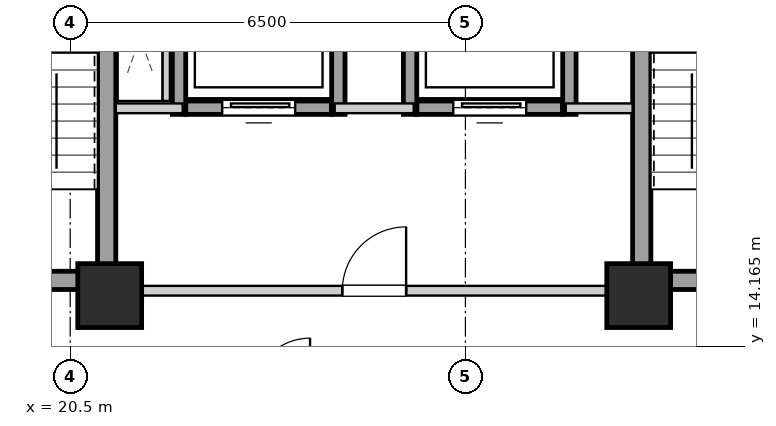
"""IFC4 building model, lengths in metres.
Left out: names, types, materials, properties, quantities, classifications, styles, units other than length and angle.
Written with IfcOpenShell. Run it as: python <this file> out.ifc"""

import sys

from ifc_helpers import new_model, si_unit, direction, frame, frame_2d, origin, origin_2d, place, context, subcontext, project, spatial, rectangle, extrude, element, fill, save


model = new_model("IFC4")
c1 = context("Model", 3, precision=1e-05, world=origin(), true_north=direction((0.0, 1.0)))
c2 = subcontext(c1, "Body", "Model", "MODEL_VIEW")
j1 = project(units=[si_unit("LENGTHUNIT", "METRE"), si_unit("PLANEANGLEUNIT", "RADIAN")], contexts=[c1])
p1 = place(None, origin())
s1 = spatial("IfcSite", under=j1, at=p1, CompositionType="ELEMENT")
p2 = place(p1, origin())
s2 = spatial("IfcBuilding", under=s1, at=p2, CompositionType="ELEMENT")
p3 = place(p2, frame((0.0, 0.0, 84.7)))
s3 = spatial("IfcBuildingStorey", under=s2, at=p3, CompositionType="ELEMENT", Elevation=84.7)
for number, where, z_axis, x_axis in (
    (1, (21.15, 15.0, 0.0), (0.0, 0.0, 1.0), (1.0, 0.0, 0.0)),
    (2, (29.85, 15.0, 0.0), (0.0, 0.0, 1.0), (1.0, 0.0, 0.0)),
):
    element("IfcColumn", number, at=place(p3, frame(where, z_axis=z_axis, x_axis=x_axis)), inside=s3, PredefinedType="COLUMN", context=c2, shape_type="SweptSolid", body=[
        extrude(rectangle(XDim=1.05, YDim=1.05, at=origin_2d()), origin(), (0.0, 0.0, 1.0), 3.2),
    ])
p4 = place(p3, frame((21.1, 15.1, 0.0), z_axis=(0.0, 0.0, 1.0), x_axis=(0.0, 1.0, 0.0)))
e3 = element("IfcWall", 3, at=p4, inside=s3, PredefinedType="SHEAR", context=c2, shape_type="SweptSolid", body=[
    extrude(rectangle(XDim=9.0, YDim=0.3, at=frame_2d((4.5, 0.0))), origin(), (0.0, 0.0, 1.0), 2.94),
])
p5 = place(p3, frame((18.1, 15.25, 0.0), z_axis=(0.0, 0.0, 1.0), x_axis=(1.0, 0.0, 0.0)))
e4 = element("IfcWall", 4, at=p5, inside=s3, PredefinedType="SHEAR", context=c2, shape_type="SweptSolid", body=[
    extrude(rectangle(XDim=2.85, YDim=0.3, at=frame_2d((1.425, 0.0))), origin(), (0.0, 0.0, 1.0), 2.94),
])
p6 = place(p5, frame((0.86, 0.0, 0.0)))
e5 = element("IfcOpeningElement", 5, at=p6, cuts=e4, PredefinedType="OPENING", context=c2, shape_type="SweptSolid", body=[
    extrude(rectangle(XDim=1.1, YDim=2.05, at=frame_2d((0.55, 1.025))), frame((0.0, 0.16, 0.0), z_axis=(0.0, -1.0, 0.0), x_axis=(1.0, 0.0, 0.0)), (0.0, 0.0, 1.0), 0.32),
])
p7 = place(p3, frame((29.9, 15.1, 0.0), z_axis=(0.0, 0.0, 1.0), x_axis=(0.0, 1.0, 0.0)))
e6 = element("IfcWall", 6, at=p7, inside=s3, PredefinedType="SHEAR", context=c2, shape_type="SweptSolid", body=[
    extrude(rectangle(XDim=9.0, YDim=0.3, at=frame_2d((4.5, 0.0))), origin(), (0.0, 0.0, 1.0), 2.94),
])
p8 = place(p3, frame((30.05, 15.25, 0.0), z_axis=(0.0, 0.0, 1.0), x_axis=(1.0, 0.0, 0.0)))
e7 = element("IfcWall", 7, at=p8, inside=s3, PredefinedType="SHEAR", context=c2, shape_type="SweptSolid", body=[
    extrude(rectangle(XDim=2.85, YDim=0.3, at=frame_2d((1.425, 0.0))), origin(), (0.0, 0.0, 1.0), 2.94),
])
p9 = place(p8, frame((0.86, 0.0, 0.0)))
e8 = element("IfcOpeningElement", 8, at=p9, cuts=e7, PredefinedType="OPENING", context=c2, shape_type="SweptSolid", body=[
    extrude(rectangle(XDim=1.1, YDim=2.05, at=frame_2d((0.55, 1.025))), frame((0.0, 0.16, 0.0), z_axis=(0.0, -1.0, 0.0), x_axis=(1.0, 0.0, 0.0)), (0.0, 0.0, 1.0), 0.32),
])
p10 = place(p3, frame((22.4, 18.09, 0.0), z_axis=(0.0, 0.0, 1.0), x_axis=(1.0, 0.0, 0.0)))
e9 = element("IfcWall", 9, at=p10, inside=s3, PredefinedType="SHEAR", context=c2, shape_type="SweptSolid", body=[
    extrude(rectangle(XDim=2.4, YDim=0.22, at=frame_2d((1.2, 0.0))), origin(), (0.0, 0.0, 1.0), 2.94),
])
p11 = place(p10, frame((0.6, 0.0, 0.0)))
e10 = element("IfcOpeningElement", 10, at=p11, cuts=e9, PredefinedType="OPENING", context=c2, shape_type="SweptSolid", body=[
    extrude(rectangle(XDim=1.2, YDim=2.15, at=frame_2d((0.6, 1.075))), frame((0.0, 0.12, 0.0), z_axis=(0.0, -1.0, 0.0), x_axis=(1.0, 0.0, 0.0)), (0.0, 0.0, 1.0), 0.24),
])
for number, where, z_axis, x_axis in (
    (11, (22.29, 17.98, 0.0), (0.0, 0.0, 1.0), (0.0, 1.0, 0.0)),
    (12, (24.91, 17.98, 0.0), (0.0, 0.0, 1.0), (0.0, 1.0, 0.0)),
):
    element("IfcWall", number, at=place(p3, frame(where, z_axis=z_axis, x_axis=x_axis)), inside=s3, PredefinedType="SHEAR", context=c2, shape_type="SweptSolid", body=[
        extrude(rectangle(XDim=2.54, YDim=0.22, at=frame_2d((1.27, 0.0))), origin(), (0.0, 0.0, 1.0), 2.94),
    ])
p12 = place(p3, frame((26.2, 18.09, 0.0), z_axis=(0.0, 0.0, 1.0), x_axis=(1.0, 0.0, 0.0)))
e13 = element("IfcWall", 13, at=p12, inside=s3, PredefinedType="SHEAR", context=c2, shape_type="SweptSolid", body=[
    extrude(rectangle(XDim=2.4, YDim=0.22, at=frame_2d((1.2, 0.0))), origin(), (0.0, 0.0, 1.0), 2.94),
])
p13 = place(p12, frame((0.6, 0.0, 0.0)))
e14 = element("IfcOpeningElement", 14, at=p13, cuts=e13, PredefinedType="OPENING", context=c2, shape_type="SweptSolid", body=[
    extrude(rectangle(XDim=1.2, YDim=2.15, at=frame_2d((0.6, 1.075))), frame((0.0, 0.12, 0.0), z_axis=(0.0, -1.0, 0.0), x_axis=(1.0, 0.0, 0.0)), (0.0, 0.0, 1.0), 0.24),
])
for number, where, z_axis, x_axis in (
    (15, (26.09, 17.98, 0.0), (0.0, 0.0, 1.0), (0.0, 1.0, 0.0)),
    (16, (28.71, 17.98, 0.0), (0.0, 0.0, 1.0), (0.0, 1.0, 0.0)),
):
    element("IfcWall", number, at=place(p3, frame(where, z_axis=z_axis, x_axis=x_axis)), inside=s3, PredefinedType="SHEAR", context=c2, shape_type="SweptSolid", body=[
        extrude(rectangle(XDim=2.54, YDim=0.22, at=frame_2d((1.27, 0.0))), origin(), (0.0, 0.0, 1.0), 2.94),
    ])
p14 = place(p3, frame((21.25, 15.08, 0.0), z_axis=(0.0, 0.0, 1.0), x_axis=(1.0, 0.0, 0.0)))
e17 = element("IfcWall", 17, at=p14, inside=s3, PredefinedType="PARTITIONING", context=c2, shape_type="SweptSolid", body=[
    extrude(rectangle(XDim=8.5, YDim=0.16, at=frame_2d((4.25, 0.0))), origin(), (0.0, 0.0, 1.0), 2.309),
])
p15 = place(p14, frame((3.725, 0.0, 0.0)))
e18 = element("IfcOpeningElement", 18, at=p15, cuts=e17, PredefinedType="OPENING", context=c2, shape_type="SweptSolid", body=[
    extrude(rectangle(XDim=1.05, YDim=2.05, at=frame_2d((0.525, 1.025))), frame((0.0, 0.09, 0.0), z_axis=(0.0, -1.0, 0.0), x_axis=(1.0, 0.0, 0.0)), (0.0, 0.0, 1.0), 0.18),
])
p16 = place(p3, frame((21.25, 18.08, 0.0), z_axis=(0.0, 0.0, 1.0), x_axis=(1.0, 0.0, 0.0)))
e19 = element("IfcWall", 19, at=p16, inside=s3, PredefinedType="PARTITIONING", context=c2, shape_type="SweptSolid", body=[
    extrude(rectangle(XDim=1.1, YDim=0.16, at=frame_2d((0.55, 0.0))), origin(), (0.0, 0.0, 1.0), 2.94),
])
p17 = place(p3, frame((24.85, 18.08, 0.0), z_axis=(0.0, 0.0, 1.0), x_axis=(1.0, 0.0, 0.0)))
e20 = element("IfcWall", 20, at=p17, inside=s3, PredefinedType="PARTITIONING", context=c2, shape_type="SweptSolid", body=[
    extrude(rectangle(XDim=1.3, YDim=0.16, at=frame_2d((0.65, 0.0))), origin(), (0.0, 0.0, 1.0), 2.94),
])
p18 = place(p3, frame((28.65, 18.08, 0.0), z_axis=(0.0, 0.0, 1.0), x_axis=(1.0, 0.0, 0.0)))
e21 = element("IfcWall", 21, at=p18, inside=s3, PredefinedType="PARTITIONING", context=c2, shape_type="SweptSolid", body=[
    extrude(rectangle(XDim=1.1, YDim=0.16, at=frame_2d((0.55, 0.0))), origin(), (0.0, 0.0, 1.0), 2.94),
])
p19 = place(p3, frame((22.08, 18.2, 0.0), z_axis=(0.0, 0.0, 1.0), x_axis=(0.0, 1.0, 0.0)))
e22 = element("IfcWall", 22, at=p19, inside=s3, PredefinedType="PARTITIONING", context=c2, shape_type="SweptSolid", body=[
    extrude(rectangle(XDim=2.12, YDim=0.12, at=frame_2d((1.06, 0.0))), origin(), (0.0, 0.0, 1.0), 2.94),
])
p20 = place(p11, origin())
e23 = element("IfcDoor", 23, at=p20, inside=s3, OperationType="SLIDING_TO_LEFT", PredefinedType="DOOR", context=c2, shape_type="SweptSolid", body=[
    extrude(rectangle(XDim=1.2, YDim=2.15, at=frame_2d((0.6, 1.075))), frame((0.0, 0.025, 0.0), z_axis=(0.0, -1.0, 0.0), x_axis=(1.0, 0.0, 0.0)), (0.0, 0.0, 1.0), 0.05),
])
fill(e10, e23)
p21 = place(p13, origin())
e24 = element("IfcDoor", 24, at=p21, inside=s3, OperationType="SLIDING_TO_LEFT", PredefinedType="DOOR", context=c2, shape_type="SweptSolid", body=[
    extrude(rectangle(XDim=1.2, YDim=2.15, at=frame_2d((0.6, 1.075))), frame((0.0, 0.025, 0.0), z_axis=(0.0, -1.0, 0.0), x_axis=(1.0, 0.0, 0.0)), (0.0, 0.0, 1.0), 0.05),
])
fill(e14, e24)
p22 = place(p15, origin())
e25 = element("IfcDoor", 25, at=p22, inside=s3, OperationType="SINGLE_SWING_RIGHT", PredefinedType="DOOR", context=c2, shape_type="SweptSolid", body=[
    extrude(rectangle(XDim=1.05, YDim=2.05, at=frame_2d((0.525, 1.025))), frame((0.0, 0.025, 0.0), z_axis=(0.0, -1.0, 0.0), x_axis=(1.0, 0.0, 0.0)), (0.0, 0.0, 1.0), 0.05),
])
fill(e18, e25)
save(model, sys.argv[1])
